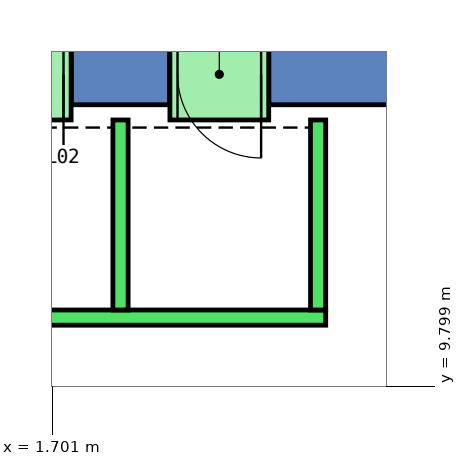
"""IFC4 building model, lengths in metres.
Left out: names, types, materials, properties, quantities, classifications, styles, units other than length and angle.
Written with IfcOpenShell. Run it as: python <this file> out.ifc"""

import sys

from ifc_helpers import new_model, si_unit, direction, frame, frame_2d, origin, place, context, subcontext, project, spatial, polyline, rectangle, outline, extrude, element, fill, save


model = new_model("IFC4")
c1 = context("Model", 3, precision=1e-05, world=origin(), true_north=direction((0.0, 1.0)))
c2 = subcontext(c1, "Body", "Model", "MODEL_VIEW")
j1 = project(units=[si_unit("LENGTHUNIT", "METRE"), si_unit("PLANEANGLEUNIT", "RADIAN")], contexts=[c1])
p1 = place(None, origin())
s1 = spatial("IfcSite", under=j1, at=p1, CompositionType="ELEMENT")
p2 = place(p1, origin())
s2 = spatial("IfcBuilding", under=s1, at=p2, CompositionType="ELEMENT")
p3 = place(p2, frame((0.0, 0.0, 15.0)))
s3 = spatial("IfcBuildingStorey", under=s2, at=p3, CompositionType="ELEMENT", Elevation=15.0)
p4 = place(p3, frame((0.0, 0.0, -0.45)))
e1 = element("IfcWall", 1, at=p4, inside=s3, PredefinedType="SHEAR", context=c2, shape_type="SweptSolid", body=[
    extrude(outline(polyline([(4.55, 14.5), (4.55, 13.5), (6.351, 13.5), (6.928, 14.5), (4.55, 14.5)])), origin(), (0.0, 0.0, 1.0), 5.0),
])
p5 = place(p3, frame((0.0, 0.0, -0.45)))
e2 = element("IfcWall", 2, at=p5, inside=s3, PredefinedType="SHEAR", context=c2, shape_type="SweptSolid", body=[
    extrude(outline(polyline([(1.95, 14.5), (1.95, 13.5), (3.25, 13.5), (3.25, 14.5), (1.95, 14.5)])), origin(), (0.0, 0.0, 1.0), 5.0),
])
p6 = place(p3, frame((0.0, 0.0, 3.6)))
e3 = element("IfcWall", 3, at=p6, inside=s3, PredefinedType="SHEAR", context=c2, shape_type="SweptSolid", body=[
    extrude(outline(polyline([(3.25, 14.5), (3.25, 13.5), (4.55, 13.5), (4.55, 14.5), (3.25, 14.5)])), origin(), (0.0, 0.0, 1.0), 0.95),
])
p7 = place(p3, frame((0.0, 0.0, 3.6)))
e4 = element("IfcWall", 4, at=p7, inside=s3, PredefinedType="SHEAR", context=c2, shape_type="SweptSolid", body=[
    extrude(outline(polyline([(0.65, 14.5), (0.65, 13.5), (1.95, 13.5), (1.95, 14.5), (0.65, 14.5)])), origin(), (0.0, 0.0, 1.0), 0.95),
])
p8 = place(p3, frame((5.3, 10.7, 0.0), z_axis=(0.0, 0.0, 1.0), x_axis=(-1.0, 0.0, 0.0)))
e5 = element("IfcWall", 5, at=p8, inside=s3, PredefinedType="STANDARD", context=c2, shape_type="SweptSolid", body=[
    extrude(rectangle(XDim=10.6, YDim=0.2, at=frame_2d((5.3, 0.0))), origin(), (0.0, 0.0, 1.0), 4.55),
])
for number, where, z_axis, x_axis in (
    (6, (5.2, 10.8, 0.0), (0.0, 0.0, 1.0), (0.0, 1.0, 0.0)),
    (7, (2.6, 10.8, 0.0), (0.0, 0.0, 1.0), (0.0, 1.0, 0.0)),
):
    element("IfcWall", number, at=place(p3, frame(where, z_axis=z_axis, x_axis=x_axis)), inside=s3, PredefinedType="STANDARD", context=c2, shape_type="SweptSolid", body=[
        extrude(rectangle(XDim=2.5, YDim=0.2, at=frame_2d((1.25, 0.0))), origin(), (0.0, 0.0, 1.0), 4.55),
    ])
p9 = place(p3, frame((4.55, 13.9, 0.0), z_axis=(0.0, 0.0, 1.0), x_axis=(-1.0, 0.0, 0.0)))
e8 = element("IfcWall", 8, at=p9, inside=s3, PredefinedType="STANDARD", context=c2, shape_type="SweptSolid", body=[
    extrude(rectangle(XDim=1.3, YDim=1.2, at=frame_2d((0.65, 0.0))), origin(), (0.0, 0.0, 1.0), 2.4),
])
p10 = place(p9, frame((0.1, 0.0, 0.0)))
e9 = element("IfcOpeningElement", 9, at=p10, cuts=e8, PredefinedType="OPENING", context=c2, shape_type="SweptSolid", body=[
    extrude(rectangle(XDim=1.1, YDim=2.3, at=frame_2d((0.55, 1.15))), frame((0.0, 0.61, 0.0), z_axis=(0.0, -1.0, 0.0), x_axis=(1.0, 0.0, 0.0)), (0.0, 0.0, 1.0), 1.22),
])
p11 = place(p3, frame((1.95, 13.9, 0.0), z_axis=(0.0, 0.0, 1.0), x_axis=(-1.0, 0.0, 0.0)))
e10 = element("IfcWall", 10, at=p11, inside=s3, PredefinedType="STANDARD", context=c2, shape_type="SweptSolid", body=[
    extrude(rectangle(XDim=1.3, YDim=1.2, at=frame_2d((0.65, 0.0))), origin(), (0.0, 0.0, 1.0), 2.4),
])
p12 = place(p11, frame((0.1, 0.0, 0.0)))
e11 = element("IfcOpeningElement", 11, at=p12, cuts=e10, PredefinedType="OPENING", context=c2, shape_type="SweptSolid", body=[
    extrude(rectangle(XDim=1.1, YDim=2.3, at=frame_2d((0.55, 1.15))), frame((0.0, 0.61, 0.0), z_axis=(0.0, -1.0, 0.0), x_axis=(1.0, 0.0, 0.0)), (0.0, 0.0, 1.0), 1.22),
])
p13 = place(p10, origin())
e12 = element("IfcDoor", 12, at=p13, inside=s3, OperationType="SLIDING_TO_LEFT", PredefinedType="DOOR", context=c2, shape_type="SweptSolid", body=[
    extrude(rectangle(XDim=1.1, YDim=2.3, at=frame_2d((0.55, 1.15))), frame((0.0, 0.025, 0.0), z_axis=(0.0, -1.0, 0.0), x_axis=(1.0, 0.0, 0.0)), (0.0, 0.0, 1.0), 0.05),
])
fill(e9, e12)
p14 = place(p12, origin())
e13 = element("IfcDoor", 13, at=p14, inside=s3, OperationType="SLIDING_TO_LEFT", PredefinedType="DOOR", context=c2, shape_type="SweptSolid", body=[
    extrude(rectangle(XDim=1.1, YDim=2.3, at=frame_2d((0.55, 1.15))), frame((0.0, 0.025, 0.0), z_axis=(0.0, -1.0, 0.0), x_axis=(1.0, 0.0, 0.0)), (0.0, 0.0, 1.0), 0.05),
])
fill(e11, e13)
save(model, sys.argv[1])
